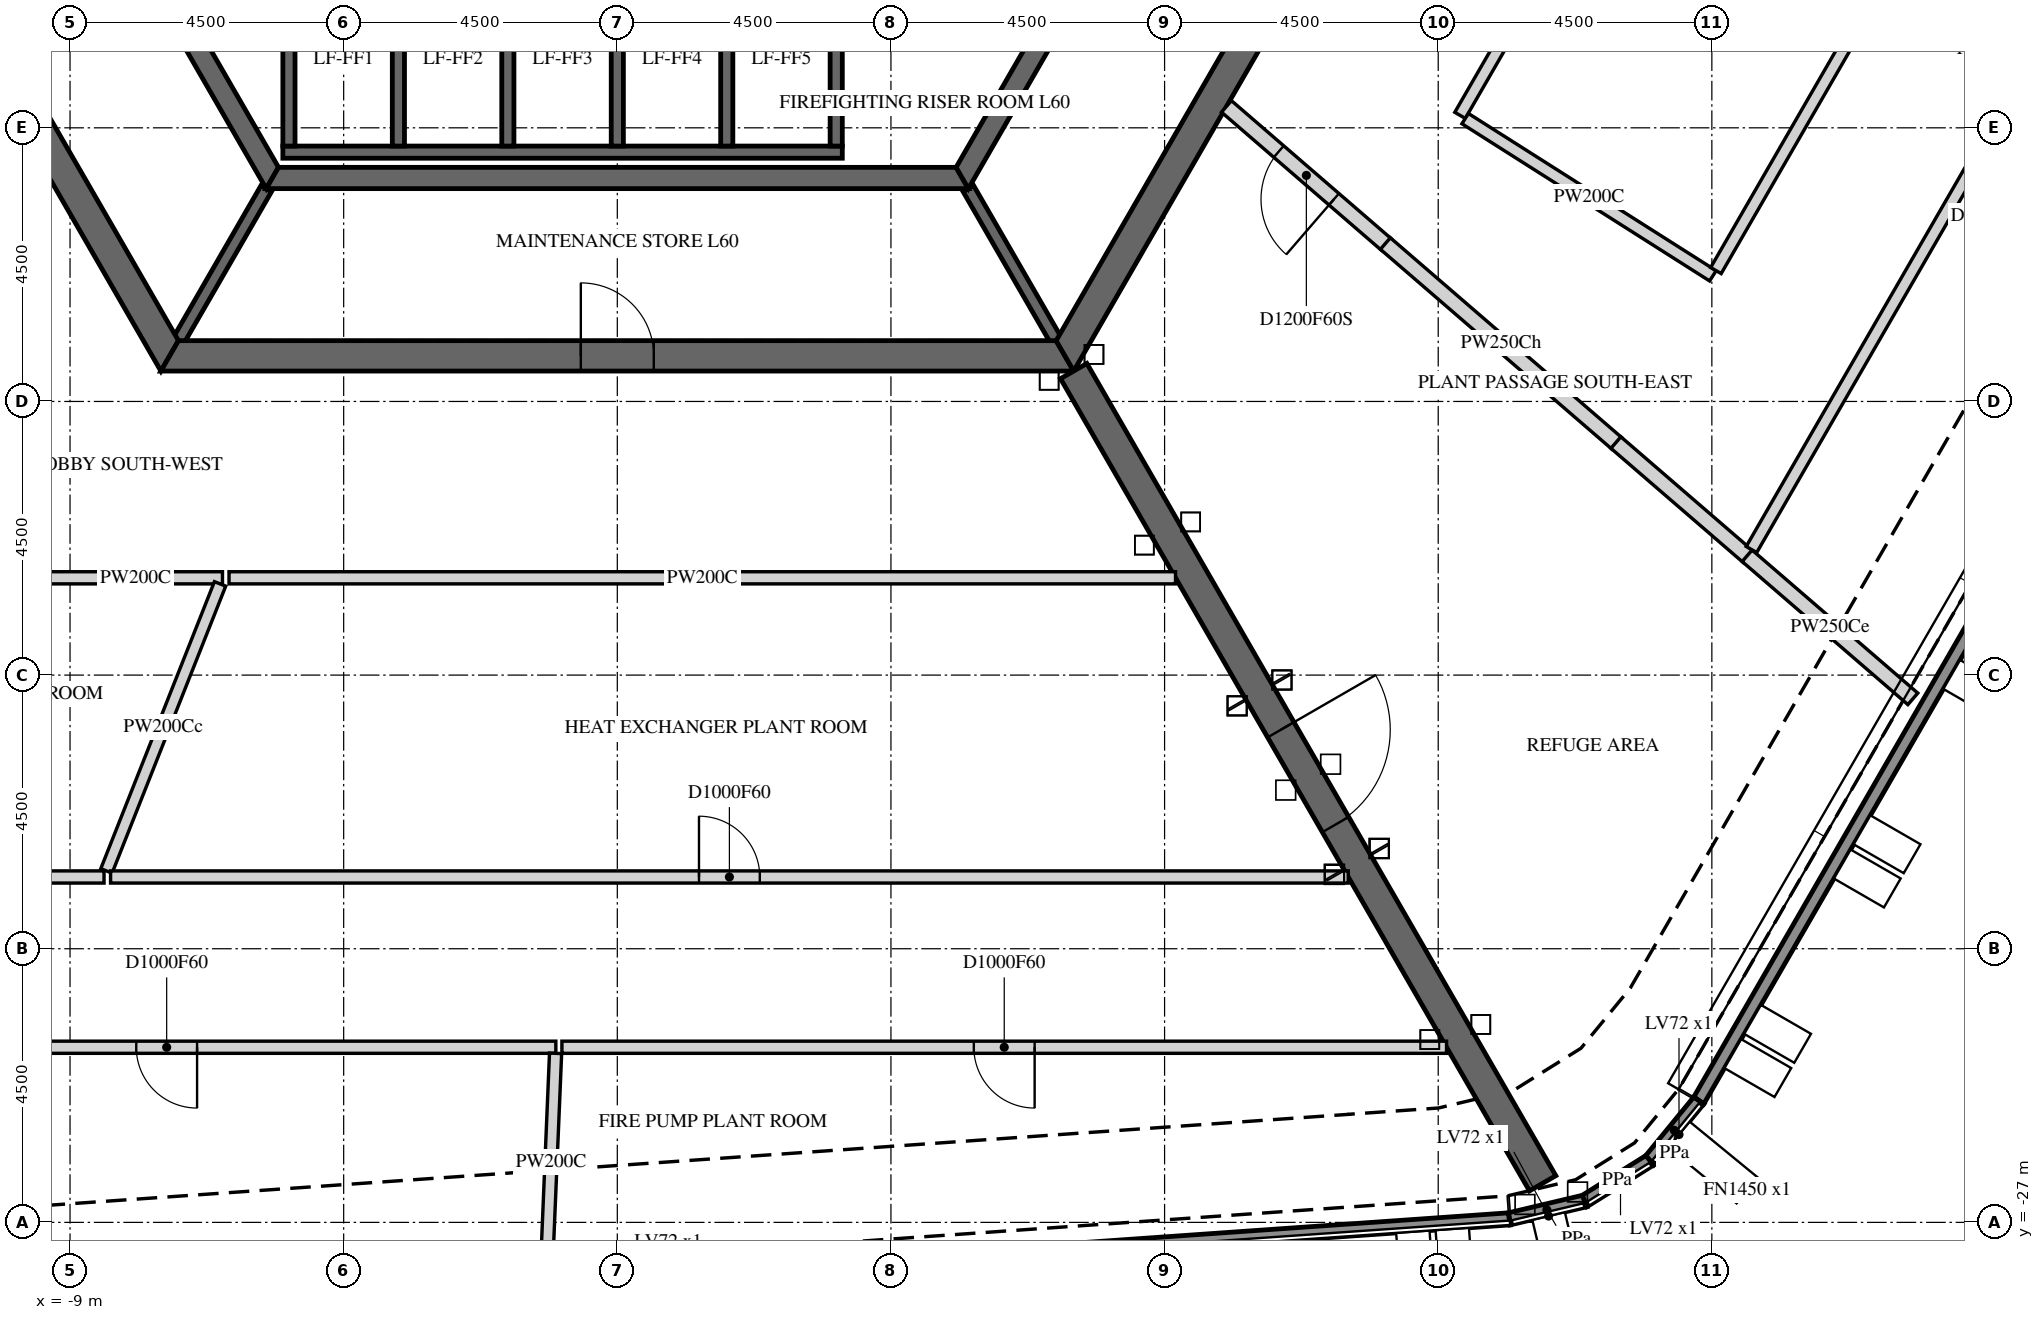
"""IFC4 building model, lengths in metres.
Left out: names, types, materials, properties, quantities, classifications, styles, units other than length and angle.
Written with IfcOpenShell. Run it as: python <this file> out.ifc"""

import sys

from ifc_helpers import new_model, si_unit, direction, frame, frame_2d, origin, place, context, subcontext, project, spatial, polyline, rectangle, outline, extrude, element, fill, save


model = new_model("IFC4")
c1 = context("Model", 3, precision=1e-05, world=origin(), true_north=direction((0.0, 1.0)))
c2 = subcontext(c1, "Body", "Model", "MODEL_VIEW")
j1 = project(units=[si_unit("LENGTHUNIT", "METRE"), si_unit("PLANEANGLEUNIT", "RADIAN")], contexts=[c1])
p1 = place(None, origin())
s1 = spatial("IfcSite", under=j1, at=p1, CompositionType="ELEMENT")
p2 = place(p1, origin())
s2 = spatial("IfcBuilding", under=s1, at=p2, CompositionType="ELEMENT")
p3 = place(p2, frame((0.0, 0.0, 250.2)))
s3 = spatial("IfcBuildingStorey", under=s2, at=p3, CompositionType="ELEMENT", Elevation=250.2)
p4 = place(p3, frame((31.656, -0.97, 5.7), z_axis=(0.0, 0.0, 1.0), x_axis=(-0.499997219864, -0.866027008891, 0.0)))
e1 = element("IfcWall", 1, at=p4, inside=s3, PredefinedType="PARAPET", context=c2, shape_type="SweptSolid", body=[
    extrude(outline(polyline([(0.009, -0.1), (27.732, -0.1), (27.749, 0.1), (-0.009, 0.1), (0.009, -0.1)])), origin(), (0.0, 0.0, 1.0), 1.1),
])
p5 = place(p3, frame((17.786, -24.994, 5.7), z_axis=(0.0, 0.0, 1.0), x_axis=(-0.633822610937, -0.773478440466, 0.0)))
e2 = element("IfcWall", 2, at=p5, inside=s3, PredefinedType="PARAPET", context=c2, shape_type="SweptSolid", body=[
    extrude(outline(polyline([(0.008, -0.1), (1.256, -0.1), (1.289, 0.1), (-0.008, 0.1), (0.008, -0.1)])), origin(), (0.0, 0.0, 1.0), 1.1),
])
p6 = place(p3, frame((16.979, -25.979, 5.7), z_axis=(0.0, 0.0, 1.0), x_axis=(-0.848052526064, -0.529912174834, 0.0)))
e3 = element("IfcWall", 3, at=p6, inside=s3, PredefinedType="PARAPET", context=c2, shape_type="SweptSolid", body=[
    extrude(outline(polyline([(0.016, -0.1), (1.248, -0.1), (1.281, 0.1), (-0.016, 0.1), (0.016, -0.1)])), origin(), (0.0, 0.0, 1.0), 1.1),
])
p7 = place(p3, frame((15.906, -26.649, 5.7), z_axis=(0.0, 0.0, 1.0), x_axis=(-0.97305877523, -0.230557194525, 0.0)))
e4 = element("IfcWall", 4, at=p7, inside=s3, PredefinedType="PARAPET", context=c2, shape_type="SweptSolid", body=[
    extrude(outline(polyline([(0.016, -0.1), (1.265, -0.1), (1.281, 0.1), (-0.016, 0.1), (0.016, -0.1)])), origin(), (0.0, 0.0, 1.0), 1.1),
])
p8 = place(p3, frame((14.668, -26.942, 5.7), z_axis=(0.0, 0.0, 1.0), x_axis=(-0.997564089626, -0.069755910774, 0.0)))
e5 = element("IfcWall", 5, at=p8, inside=s3, PredefinedType="PARAPET", context=c2, shape_type="SweptSolid", body=[
    extrude(outline(polyline([(0.008, -0.1), (27.731, -0.1), (27.75, 0.1), (-0.008, 0.1), (0.008, -0.1)])), origin(), (0.0, 0.0, 1.0), 1.1),
])
p9 = place(p3, frame((-14.722, 0.0, -0.3), z_axis=(0.0, 0.0, 1.0), x_axis=(0.50000571537, -0.866022103989, 0.0)))
e6 = element("IfcWall", 6, at=p9, inside=s3, PredefinedType="SHEAR", context=c2, shape_type="SweptSolid", body=[
    extrude(outline(polyline([(-0.144, -0.25), (14.867, -0.25), (14.578, 0.25), (0.144, 0.25), (-0.144, -0.25)])), origin(), (0.0, 0.0, 1.0), 5.8),
])
p10 = place(p9, frame((6.432, 0.0, 0.3)))
e7 = element("IfcOpeningElement", 7, at=p10, cuts=e6, PredefinedType="OPENING", context=c2, shape_type="SweptSolid", body=[
    extrude(rectangle(XDim=1.8, YDim=2.4, at=frame_2d((0.9, 1.2))), frame((0.0, 0.26, 0.0), z_axis=(0.0, -1.0, 0.0), x_axis=(1.0, 0.0, 0.0)), (0.0, 0.0, 1.0), 0.52),
])
p11 = place(p3, frame((-7.361, -12.75, -0.3), z_axis=(0.0, 0.0, 1.0), x_axis=(1.0, 0.0, 0.0)))
e8 = element("IfcWall", 8, at=p11, inside=s3, PredefinedType="SHEAR", context=c2, shape_type="SweptSolid", body=[
    extrude(outline(polyline([(-0.144, -0.25), (14.866, -0.25), (14.578, 0.25), (0.144, 0.25), (-0.144, -0.25)])), origin(), (0.0, 0.0, 1.0), 5.8),
])
p12 = place(p11, frame((6.761, 0.0, 0.3)))
e9 = element("IfcOpeningElement", 9, at=p12, cuts=e8, PredefinedType="OPENING", context=c2, shape_type="SweptSolid", body=[
    extrude(rectangle(XDim=1.2, YDim=2.4, at=frame_2d((0.6, 1.2))), frame((0.0, 0.26, 0.0), z_axis=(0.0, -1.0, 0.0), x_axis=(1.0, 0.0, 0.0)), (0.0, 0.0, 1.0), 0.52),
])
p13 = place(p3, frame((7.361, -12.75, -0.3), z_axis=(0.0, 0.0, 1.0), x_axis=(0.50000571537, 0.866022103989, 0.0)))
e10 = element("IfcWall", 10, at=p13, inside=s3, PredefinedType="SHEAR", context=c2, shape_type="SweptSolid", body=[
    extrude(outline(polyline([(-0.144, -0.25), (14.867, -0.25), (14.578, 0.25), (0.144, 0.25), (-0.144, -0.25)])), origin(), (0.0, 0.0, 1.0), 5.8),
])
p14 = place(p13, frame((6.49, 0.0, 0.3)))
e11 = element("IfcOpeningElement", 11, at=p14, cuts=e10, PredefinedType="OPENING", context=c2, shape_type="SweptSolid", body=[
    extrude(rectangle(XDim=1.8, YDim=2.4, at=frame_2d((0.9, 1.2))), frame((0.0, 0.26, 0.0), z_axis=(0.0, -1.0, 0.0), x_axis=(1.0, 0.0, 0.0)), (0.0, 0.0, 1.0), 0.52),
])
p15 = place(p3, frame((7.506, -13.0, -0.3), z_axis=(0.0, 0.0, 1.0), x_axis=(0.499988271576, -0.866032175087, 0.0)))
e12 = element("IfcWall", 12, at=p15, inside=s3, PredefinedType="SHEAR", context=c2, shape_type="SweptSolid", body=[
    extrude(rectangle(XDim=15.424, YDim=0.5, at=frame_2d((7.712, 0.0))), origin(), (0.0, 0.0, 1.0), 5.8),
])
p16 = place(p15, frame((6.812, 0.0, 0.3)))
e13 = element("IfcOpeningElement", 13, at=p16, cuts=e12, PredefinedType="OPENING", context=c2, shape_type="SweptSolid", body=[
    extrude(rectangle(XDim=1.8, YDim=2.4, at=frame_2d((0.9, 1.2))), frame((0.0, 0.26, 0.0), z_axis=(0.0, -1.0, 0.0), x_axis=(1.0, 0.0, 0.0)), (0.0, 0.0, 1.0), 0.52),
])
p17 = place(p3, frame((-11.345, 0.0, -0.3), z_axis=(0.0, 0.0, 1.0), x_axis=(0.499995046907, -0.866028263435, 0.0)))
e14 = element("IfcWall", 14, at=p17, inside=s3, PredefinedType="SHEAR", context=c2, shape_type="SweptSolid", body=[
    extrude(outline(polyline([(-0.101, -0.175), (11.446, -0.175), (11.244, 0.175), (0.101, 0.175), (-0.101, -0.175)])), origin(), (0.0, 0.0, 1.0), 5.8),
])
p18 = place(p17, frame((4.744, 0.0, 0.3)))
e15 = element("IfcOpeningElement", 15, at=p18, cuts=e14, PredefinedType="OPENING", context=c2, shape_type="SweptSolid", body=[
    extrude(rectangle(XDim=1.8, YDim=2.4, at=frame_2d((0.9, 1.2))), frame((0.0, 0.185, 0.0), z_axis=(0.0, -1.0, 0.0), x_axis=(1.0, 0.0, 0.0)), (0.0, 0.0, 1.0), 0.37),
])
p19 = place(p3, frame((-5.673, -9.825, -0.3), z_axis=(0.0, 0.0, 1.0), x_axis=(1.0, 0.0, 0.0)))
e16 = element("IfcWall", 16, at=p19, inside=s3, PredefinedType="SHEAR", context=c2, shape_type="SweptSolid", body=[
    extrude(outline(polyline([(-0.101, -0.175), (11.446, -0.175), (11.244, 0.175), (0.101, 0.175), (-0.101, -0.175)])), origin(), (0.0, 0.0, 1.0), 5.8),
])
p20 = place(p3, frame((5.673, -9.825, -0.3), z_axis=(0.0, 0.0, 1.0), x_axis=(0.499995046907, 0.866028263435, 0.0)))
e17 = element("IfcWall", 17, at=p20, inside=s3, PredefinedType="SHEAR", context=c2, shape_type="SweptSolid", body=[
    extrude(outline(polyline([(-0.101, -0.175), (11.446, -0.175), (11.244, 0.175), (0.101, 0.175), (-0.101, -0.175)])), origin(), (0.0, 0.0, 1.0), 5.8),
])
p21 = place(p20, frame((4.801, 0.0, 0.3)))
e18 = element("IfcOpeningElement", 18, at=p21, cuts=e17, PredefinedType="OPENING", context=c2, shape_type="SweptSolid", body=[
    extrude(rectangle(XDim=1.8, YDim=2.4, at=frame_2d((0.9, 1.2))), frame((0.0, 0.185, 0.0), z_axis=(0.0, -1.0, 0.0), x_axis=(1.0, 0.0, 0.0)), (0.0, 0.0, 1.0), 0.37),
])
p22 = place(p3, frame((-5.5, -9.4, -0.25), z_axis=(0.0, 0.0, 1.0), x_axis=(1.0, 0.0, 0.0)))
e19 = element("IfcWall", 19, at=p22, inside=s3, PredefinedType="SHEAR", context=c2, shape_type="SweptSolid", body=[
    extrude(rectangle(XDim=9.2, YDim=0.2, at=frame_2d((4.6, 0.0))), origin(), (0.0, 0.0, 1.0), 5.75),
])
for number, where, z_axis, x_axis in (
    (20, (-5.4, -9.3, -0.25), (0.0, 0.0, 1.0), (0.0, 1.0, 0.0)),
    (21, (-3.6, -9.3, -0.25), (0.0, 0.0, 1.0), (0.0, 1.0, 0.0)),
    (22, (-1.8, -9.3, -0.25), (0.0, 0.0, 1.0), (0.0, 1.0, 0.0)),
    (23, (0.0, -9.3, -0.25), (0.0, 0.0, 1.0), (0.0, 1.0, 0.0)),
    (24, (1.8, -9.3, -0.25), (0.0, 0.0, 1.0), (0.0, 1.0, 0.0)),
    (25, (3.6, -9.3, -0.25), (0.0, 0.0, 1.0), (0.0, 1.0, 0.0)),
):
    element("IfcWall", number, at=place(p3, frame(where, z_axis=z_axis, x_axis=x_axis)), inside=s3, PredefinedType="SHEAR", context=c2, shape_type="SweptSolid", body=[
        extrude(rectangle(XDim=2.9, YDim=0.2, at=frame_2d((1.45, 0.0))), origin(), (0.0, 0.0, 1.0), 5.75),
    ])
for number, where, z_axis, x_axis in (
    (26, (-5.773, -10.0, -0.3), (0.0, 0.0, 1.0), (-0.5, -0.866, 0.0)),
    (27, (5.773, -10.0, -0.3), (0.0, 0.0, 1.0), (0.5, -0.866, 0.0)),
):
    element("IfcWall", number, at=place(p3, frame(where, z_axis=z_axis, x_axis=x_axis)), inside=s3, PredefinedType="SHEAR", context=c2, shape_type="SweptSolid", body=[
        extrude(rectangle(XDim=2.887, YDim=0.2, at=frame_2d((1.443, 0.0))), origin(), (0.0, 0.0, 1.0), 5.8),
    ])
p23 = place(p3, frame((-1.011, -24.12, 0.0), z_axis=(0.0, 0.0, 1.0), x_axis=(-1.0, 0.0, 0.0)))
e28 = element("IfcWall", 28, at=p23, inside=s3, PredefinedType="PARTITIONING", context=c2, shape_type="SweptSolid", body=[
    extrude(rectangle(XDim=12.8, YDim=0.2, at=frame_2d((6.4, 0.0))), origin(), (0.0, 0.0, 1.0), 5.5),
])
p24 = place(p23, frame((5.9, 0.0, 0.0)))
e29 = element("IfcOpeningElement", 29, at=p24, cuts=e28, PredefinedType="OPENING", context=c2, shape_type="SweptSolid", body=[
    extrude(rectangle(XDim=1.0, YDim=2.1, at=frame_2d((0.5, 1.05))), frame((0.0, 0.11, 0.0), z_axis=(0.0, -1.0, 0.0), x_axis=(1.0, 0.0, 0.0)), (0.0, 0.0, 1.0), 0.22),
])
p25 = place(p3, frame((-9.354, -16.4, 0.0), z_axis=(0.0, 0.0, 1.0), x_axis=(1.0, 0.0, 0.0)))
e30 = element("IfcWall", 30, at=p25, inside=s3, PredefinedType="PARTITIONING", context=c2, shape_type="SweptSolid", body=[
    extrude(rectangle(XDim=2.861, YDim=0.2, at=frame_2d((1.43, 0.0))), origin(), (0.0, 0.0, 1.0), 5.5),
])
p26 = place(p3, frame((-8.441, -21.32, 0.0), z_axis=(0.0, 0.0, 1.0), x_axis=(-1.0, 0.0, 0.0)))
e31 = element("IfcWall", 31, at=p26, inside=s3, PredefinedType="PARTITIONING", context=c2, shape_type="SweptSolid", body=[
    extrude(rectangle(XDim=3.753, YDim=0.2, at=frame_2d((1.876, 0.0))), origin(), (0.0, 0.0, 1.0), 5.5),
])
p27 = place(p3, frame((-8.401, -21.22, 0.0), z_axis=(0.0, 0.0, 1.0), x_axis=(0.368104754475, 0.92978432431, 0.0)))
e32 = element("IfcWall", 32, at=p27, inside=s3, PredefinedType="PARTITIONING", context=c2, shape_type="SweptSolid", body=[
    extrude(rectangle(XDim=5.076, YDim=0.2, at=frame_2d((2.538, 0.0))), origin(), (0.0, 0.0, 1.0), 4.573),
])
p28 = place(p3, frame((-6.385, -16.4, 0.0), z_axis=(0.0, 0.0, 1.0), x_axis=(1.0, 0.0, 0.0)))
e33 = element("IfcWall", 33, at=p28, inside=s3, PredefinedType="PARTITIONING", context=c2, shape_type="SweptSolid", body=[
    extrude(rectangle(XDim=15.565, YDim=0.2, at=frame_2d((7.783, 0.0))), origin(), (0.0, 0.0, 1.0), 5.5),
])
p29 = place(p3, frame((-1.165, -27.798, 0.0), z_axis=(0.0, 0.0, 1.0), x_axis=(0.041928296331, 0.999120622331, 0.0)))
e34 = element("IfcWall", 34, at=p29, inside=s3, PredefinedType="PARTITIONING", context=c2, shape_type="SweptSolid", body=[
    extrude(rectangle(XDim=3.581, YDim=0.2, at=frame_2d((1.791, 0.0))), origin(), (0.0, 0.0, 1.0), 5.5),
])
p30 = place(p3, frame((13.637, -24.12, 0.0), z_axis=(0.0, 0.0, 1.0), x_axis=(-1.0, 0.0, 0.0)))
e35 = element("IfcWall", 35, at=p30, inside=s3, PredefinedType="PARTITIONING", context=c2, shape_type="SweptSolid", body=[
    extrude(rectangle(XDim=14.548, YDim=0.2, at=frame_2d((7.274, 0.0))), origin(), (0.0, 0.0, 1.0), 5.5),
])
p31 = place(p30, frame((6.774, 0.0, 0.0)))
e36 = element("IfcOpeningElement", 36, at=p31, cuts=e35, PredefinedType="OPENING", context=c2, shape_type="SweptSolid", body=[
    extrude(rectangle(XDim=1.0, YDim=2.1, at=frame_2d((0.5, 1.05))), frame((0.0, 0.11, 0.0), z_axis=(0.0, -1.0, 0.0), x_axis=(1.0, 0.0, 0.0)), (0.0, 0.0, 1.0), 0.22),
])
p32 = place(p3, frame((12.645, -10.917, 0.0), z_axis=(0.0, 0.0, 1.0), x_axis=(-0.756778725629, 0.653671140892, 0.0)))
e37 = element("IfcWall", 37, at=p32, inside=s3, PredefinedType="PARTITIONING", context=c2, shape_type="SweptSolid", body=[
    extrude(rectangle(XDim=3.471, YDim=0.25, at=frame_2d((1.736, 0.0))), origin(), (0.0, 0.0, 1.0), 4.573),
])
p33 = place(p32, frame((1.135, 0.0, 0.0)))
e38 = element("IfcOpeningElement", 38, at=p33, cuts=e37, PredefinedType="OPENING", context=c2, shape_type="SweptSolid", body=[
    extrude(rectangle(XDim=1.2, YDim=2.1, at=frame_2d((0.6, 1.05))), frame((0.0, 0.135, 0.0), z_axis=(0.0, -1.0, 0.0), x_axis=(1.0, 0.0, 0.0)), (0.0, 0.0, 1.0), 0.27),
])
p34 = place(p3, frame((-8.333, -21.32, 0.0), z_axis=(0.0, 0.0, 1.0), x_axis=(1.0, 0.0, 0.0)))
e39 = element("IfcWall", 39, at=p34, inside=s3, PredefinedType="PARTITIONING", context=c2, shape_type="SweptSolid", body=[
    extrude(rectangle(XDim=20.354, YDim=0.2, at=frame_2d((10.177, 0.0))), origin(), (0.0, 0.0, 1.0), 5.5),
])
p35 = place(p34, frame((9.677, 0.0, 0.0)))
e40 = element("IfcOpeningElement", 40, at=p35, cuts=e39, PredefinedType="OPENING", context=c2, shape_type="SweptSolid", body=[
    extrude(rectangle(XDim=1.0, YDim=2.1, at=frame_2d((0.5, 1.05))), frame((0.0, 0.11, 0.0), z_axis=(0.0, -1.0, 0.0), x_axis=(1.0, 0.0, 0.0)), (0.0, 0.0, 1.0), 0.22),
])
p36 = place(p3, frame((12.631, -10.903, 0.0), z_axis=(0.0, 0.0, 1.0), x_axis=(0.756924533262, -0.653502296053, 0.0)))
e41 = element("IfcWall", 41, at=p36, inside=s3, PredefinedType="PARTITIONING", context=c2, shape_type="SweptSolid", body=[
    extrude(rectangle(XDim=5.028, YDim=0.25, at=frame_2d((2.514, 0.0))), origin(), (0.0, 0.0, 1.0), 4.573),
])
p37 = place(p3, frame((13.859, -8.795, 0.0), z_axis=(0.0, 0.0, 1.0), x_axis=(0.500027655771, 0.866009436129, 0.0)))
e42 = element("IfcWall", 42, at=p37, inside=s3, PredefinedType="PARTITIONING", context=c2, shape_type="SweptSolid", body=[
    extrude(rectangle(XDim=10.156, YDim=0.2, at=frame_2d((5.078, 0.0))), origin(), (0.0, 0.0, 1.0), 5.5),
])
p38 = place(p3, frame((16.422, -14.176, 0.0), z_axis=(0.0, 0.0, 1.0), x_axis=(0.756922439124, -0.653504721598, 0.0)))
e43 = element("IfcWall", 43, at=p38, inside=s3, PredefinedType="PARTITIONING", context=c2, shape_type="SweptSolid", body=[
    extrude(rectangle(XDim=2.871, YDim=0.25, at=frame_2d((1.435, 0.0))), origin(), (0.0, 0.0, 1.0), 5.5),
])
p39 = place(p3, frame((18.017, -11.434, 0.0), z_axis=(0.0, 0.0, 1.0), x_axis=(-0.844296399795, 0.535876468315, 0.0)))
e44 = element("IfcWall", 44, at=p39, inside=s3, PredefinedType="PARTITIONING", context=c2, shape_type="SweptSolid", body=[
    extrude(rectangle(XDim=4.825, YDim=0.2, at=frame_2d((2.412, 0.0))), origin(), (0.0, 0.0, 1.0), 5.5),
])
p40 = place(p3, frame((18.58, -16.038, 0.0), z_axis=(0.0, 0.0, 1.0), x_axis=(0.756983085106, -0.653434471744, 0.0)))
e45 = element("IfcWall", 45, at=p40, inside=s3, PredefinedType="PARTITIONING", context=c2, shape_type="SweptSolid", body=[
    extrude(rectangle(XDim=3.6, YDim=0.25, at=frame_2d((1.8, 0.0))), origin(), (0.0, 0.0, 1.0), 5.5),
])
p41 = place(p3, frame((26.564, -2.231, 0.0), z_axis=(0.0, 0.0, 1.0), x_axis=(-0.500020273296, -0.866013698675, 0.0)))
e46 = element("IfcWall", 46, at=p41, inside=s3, PredefinedType="PARTITIONING", context=c2, shape_type="SweptSolid", body=[
    extrude(rectangle(XDim=15.824, YDim=0.2, at=frame_2d((7.912, 0.0))), origin(), (0.0, 0.0, 1.0), 5.5),
])
p42 = place(p41, frame((7.412, 0.0, 0.0)))
e47 = element("IfcOpeningElement", 47, at=p42, cuts=e46, PredefinedType="OPENING", context=c2, shape_type="SweptSolid", body=[
    extrude(rectangle(XDim=1.0, YDim=2.1, at=frame_2d((0.5, 1.05))), frame((0.0, 0.11, 0.0), z_axis=(0.0, -1.0, 0.0), x_axis=(1.0, 0.0, 0.0)), (0.0, 0.0, 1.0), 0.22),
])
p43 = place(p3, frame((18.067, -11.347, 0.0), z_axis=(0.0, 0.0, 1.0), x_axis=(0.49997251285, 0.866041272916, 0.0)))
e48 = element("IfcWall", 48, at=p43, inside=s3, PredefinedType="PARTITIONING", context=c2, shape_type="SweptSolid", body=[
    extrude(rectangle(XDim=12.987, YDim=0.2, at=frame_2d((6.494, 0.0))), origin(), (0.0, 0.0, 1.0), 5.5),
])
p44 = place(p43, frame((5.994, 0.0, 0.0)))
e49 = element("IfcOpeningElement", 49, at=p44, cuts=e48, PredefinedType="OPENING", context=c2, shape_type="SweptSolid", body=[
    extrude(rectangle(XDim=1.0, YDim=2.1, at=frame_2d((0.5, 1.05))), frame((0.0, 0.11, 0.0), z_axis=(0.0, -1.0, 0.0), x_axis=(1.0, 0.0, 0.0)), (0.0, 0.0, 1.0), 0.22),
])
p45 = place(p12, origin())
e50 = element("IfcDoor", 50, at=p45, inside=s3, OperationType="SINGLE_SWING_LEFT", PredefinedType="DOOR", context=c2, shape_type="SweptSolid", body=[
    extrude(rectangle(XDim=1.2, YDim=2.4, at=frame_2d((0.6, 1.2))), frame((0.0, 0.025, 0.0), z_axis=(0.0, -1.0, 0.0), x_axis=(1.0, 0.0, 0.0)), (0.0, 0.0, 1.0), 0.05),
])
fill(e9, e50)
p46 = place(p16, origin())
e51 = element("IfcDoor", 51, at=p46, inside=s3, OperationType="DOUBLE_DOOR_SINGLE_SWING", PredefinedType="DOOR", context=c2, shape_type="SweptSolid", body=[
    extrude(rectangle(XDim=1.8, YDim=2.4, at=frame_2d((0.9, 1.2))), frame((0.0, 0.025, 0.0), z_axis=(0.0, -1.0, 0.0), x_axis=(1.0, 0.0, 0.0)), (0.0, 0.0, 1.0), 0.05),
])
fill(e13, e51)
p47 = place(p24, origin())
e52 = element("IfcDoor", 52, at=p47, inside=s3, OperationType="SINGLE_SWING_LEFT", PredefinedType="DOOR", context=c2, shape_type="SweptSolid", body=[
    extrude(rectangle(XDim=1.0, YDim=2.1, at=frame_2d((0.5, 1.05))), frame((0.0, 0.025, 0.0), z_axis=(0.0, -1.0, 0.0), x_axis=(1.0, 0.0, 0.0)), (0.0, 0.0, 1.0), 0.05),
])
fill(e29, e52)
p48 = place(p31, origin())
e53 = element("IfcDoor", 53, at=p48, inside=s3, OperationType="SINGLE_SWING_LEFT", PredefinedType="DOOR", context=c2, shape_type="SweptSolid", body=[
    extrude(rectangle(XDim=1.0, YDim=2.1, at=frame_2d((0.5, 1.05))), frame((0.0, 0.025, 0.0), z_axis=(0.0, -1.0, 0.0), x_axis=(1.0, 0.0, 0.0)), (0.0, 0.0, 1.0), 0.05),
])
fill(e36, e53)
p49 = place(p33, origin())
e54 = element("IfcDoor", 54, at=p49, inside=s3, OperationType="SINGLE_SWING_LEFT", PredefinedType="DOOR", context=c2, shape_type="SweptSolid", body=[
    extrude(rectangle(XDim=1.2, YDim=2.1, at=frame_2d((0.6, 1.05))), frame((0.0, 0.025, 0.0), z_axis=(0.0, -1.0, 0.0), x_axis=(1.0, 0.0, 0.0)), (0.0, 0.0, 1.0), 0.05),
])
fill(e38, e54)
p50 = place(p35, origin())
e55 = element("IfcDoor", 55, at=p50, inside=s3, OperationType="SINGLE_SWING_RIGHT", PredefinedType="DOOR", context=c2, shape_type="SweptSolid", body=[
    extrude(rectangle(XDim=1.0, YDim=2.1, at=frame_2d((0.5, 1.05))), frame((0.0, 0.025, 0.0), z_axis=(0.0, -1.0, 0.0), x_axis=(1.0, 0.0, 0.0)), (0.0, 0.0, 1.0), 0.05),
])
fill(e40, e55)
save(model, sys.argv[1])
